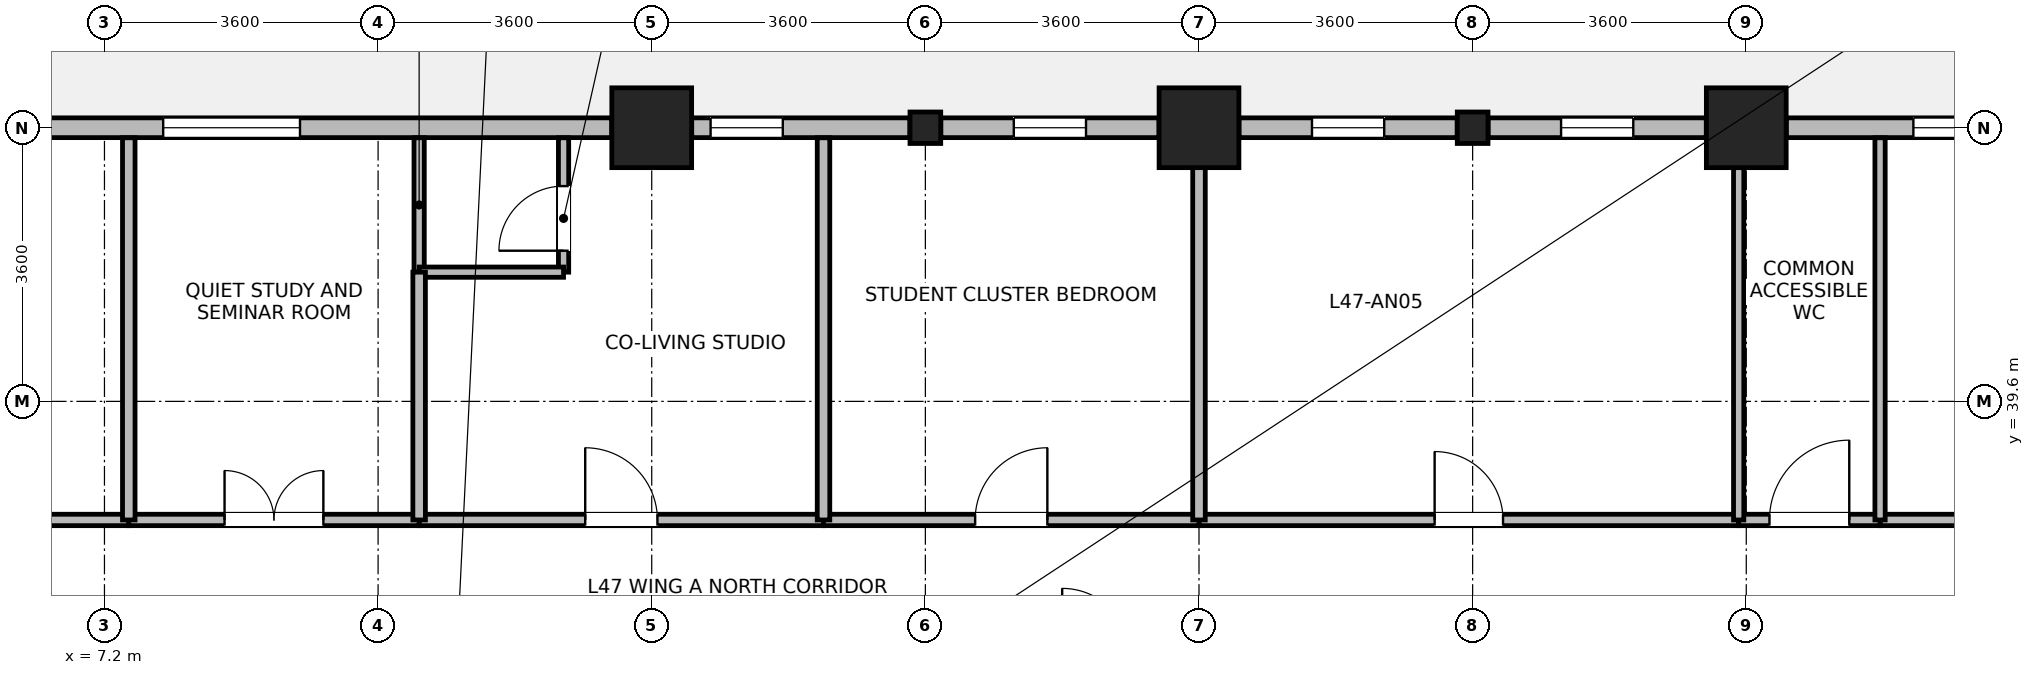
"""IFC4 building model, lengths in metres.
Left out: names, types, materials, properties, quantities, classifications, styles, units other than length and angle.
Written with IfcOpenShell. Run it as: python <this file> out.ifc"""

import sys

from ifc_helpers import new_model, si_unit, direction, frame, frame_2d, origin, origin_2d, place, context, subcontext, project, spatial, rectangle, i_section, extrude, source, transform, mapped, element, fill, save


model = new_model("IFC4")
c1 = context("Model", 3, precision=1e-05, world=origin(), true_north=direction((0.0, 1.0)))
c2 = subcontext(c1, "Body", "Model", "MODEL_VIEW")
j1 = project(units=[si_unit("LENGTHUNIT", "METRE"), si_unit("PLANEANGLEUNIT", "RADIAN")], contexts=[c1])
p1 = place(None, origin())
s1 = spatial("IfcSite", under=j1, at=p1, CompositionType="ELEMENT")
p2 = place(p1, origin())
s2 = spatial("IfcBuilding", under=s1, at=p2, CompositionType="ELEMENT")
p3 = place(p2, frame((0.0, 0.0, 184.6)))
s3 = spatial("IfcBuildingStorey", under=s2, at=p3, CompositionType="ELEMENT", Elevation=184.6)
m1 = source(origin(), c2, "Body", "SweptSolid", [
    extrude(rectangle(XDim=1.05, YDim=1.05, at=origin_2d()), origin(), (0.0, 0.0, 1.0), 3.7),
])
for number, where, z_axis, x_axis in (
    (1, (14.4, 43.2, 0.0), (0.0, 0.0, 1.0), (1.0, 0.0, 0.0)),
    (2, (21.6, 43.2, 0.0), (0.0, 0.0, 1.0), (1.0, 0.0, 0.0)),
    (3, (28.8, 43.2, 0.0), (0.0, 0.0, 1.0), (1.0, 0.0, 0.0)),
):
    element("IfcColumn", number, at=place(p3, frame(where, z_axis=z_axis, x_axis=x_axis)), inside=s3, PredefinedType="COLUMN", context=c2, shape_type="MappedRepresentation", body=[
        mapped(m1, transform((0.0, 0.0, 0.0), x_axis=(1.0, 0.0, 0.0), y_axis=(0.0, 1.0, 0.0), z_axis=(0.0, 0.0, 1.0), scale=1.0)),
    ])
m2 = source(origin(), c2, "Body", "SweptSolid", [
    extrude(i_section(OverallWidth=0.404, OverallDepth=0.414, WebThickness=0.021, FlangeThickness=0.028, FilletRadius=0.015, at=origin_2d()), origin(), (0.0, 0.0, 1.0), 3.7),
])
for number, where, z_axis, x_axis in (
    (4, (18.0, 43.2, 0.0), (0.0, 0.0, 1.0), (1.0, 0.0, 0.0)),
    (5, (25.2, 43.2, 0.0), (0.0, 0.0, 1.0), (1.0, 0.0, 0.0)),
):
    element("IfcColumn", number, at=place(p3, frame(where, z_axis=z_axis, x_axis=x_axis)), inside=s3, PredefinedType="COLUMN", context=c2, shape_type="MappedRepresentation", body=[
        mapped(m2, transform((0.0, 0.0, 0.0), x_axis=(1.0, 0.0, 0.0), y_axis=(0.0, 1.0, 0.0), z_axis=(0.0, 0.0, 1.0), scale=1.0)),
    ])
p4 = place(p3, frame((29.326, 43.2, 0.0), z_axis=(0.0, 0.0, 1.0), x_axis=(1.0, 0.0, 0.0)))
e6 = element("IfcWall", 6, at=p4, inside=s3, PredefinedType="STANDARD", context=c2, shape_type="SweptSolid", body=[
    extrude(rectangle(XDim=2.871, YDim=0.26, at=frame_2d((1.436, 0.0))), origin(), (0.0, 0.0, 1.0), 2.99),
])
p5 = place(p4, frame((1.673, 0.0, 0.85)))
e7 = element("IfcOpeningElement", 7, at=p5, cuts=e6, PredefinedType="OPENING", context=c2, shape_type="SweptSolid", body=[
    extrude(rectangle(XDim=0.95, YDim=1.75, at=frame_2d((0.475, 0.875))), frame((0.0, 0.14, 0.0), z_axis=(0.0, -1.0, 0.0), x_axis=(1.0, 0.0, 0.0)), (0.0, 0.0, 1.0), 0.28),
])
p6 = place(p3, frame((25.403, 43.2, 0.0), z_axis=(0.0, 0.0, 1.0), x_axis=(1.0, 0.0, 0.0)))
e8 = element("IfcWall", 8, at=p6, inside=s3, PredefinedType="STANDARD", context=c2, shape_type="SweptSolid", body=[
    extrude(rectangle(XDim=2.871, YDim=0.26, at=frame_2d((1.436, 0.0))), origin(), (0.0, 0.0, 1.0), 2.99),
])
p7 = place(p6, frame((0.96, 0.0, 0.85)))
e9 = element("IfcOpeningElement", 9, at=p7, cuts=e8, PredefinedType="OPENING", context=c2, shape_type="SweptSolid", body=[
    extrude(rectangle(XDim=0.95, YDim=1.75, at=frame_2d((0.475, 0.875))), frame((0.0, 0.14, 0.0), z_axis=(0.0, -1.0, 0.0), x_axis=(1.0, 0.0, 0.0)), (0.0, 0.0, 1.0), 0.28),
])
p8 = place(p3, frame((22.126, 43.2, 0.0), z_axis=(0.0, 0.0, 1.0), x_axis=(1.0, 0.0, 0.0)))
e10 = element("IfcWall", 10, at=p8, inside=s3, PredefinedType="STANDARD", context=c2, shape_type="SweptSolid", body=[
    extrude(rectangle(XDim=2.871, YDim=0.26, at=frame_2d((1.436, 0.0))), origin(), (0.0, 0.0, 1.0), 2.99),
])
p9 = place(p8, frame((0.96, 0.0, 0.85)))
e11 = element("IfcOpeningElement", 11, at=p9, cuts=e10, PredefinedType="OPENING", context=c2, shape_type="SweptSolid", body=[
    extrude(rectangle(XDim=0.95, YDim=1.75, at=frame_2d((0.475, 0.875))), frame((0.0, 0.14, 0.0), z_axis=(0.0, -1.0, 0.0), x_axis=(1.0, 0.0, 0.0)), (0.0, 0.0, 1.0), 0.28),
])
p10 = place(p3, frame((18.203, 43.2, 0.0), z_axis=(0.0, 0.0, 1.0), x_axis=(1.0, 0.0, 0.0)))
e12 = element("IfcWall", 12, at=p10, inside=s3, PredefinedType="STANDARD", context=c2, shape_type="SweptSolid", body=[
    extrude(rectangle(XDim=2.871, YDim=0.26, at=frame_2d((1.436, 0.0))), origin(), (0.0, 0.0, 1.0), 2.99),
])
p11 = place(p10, frame((0.96, 0.0, 0.85)))
e13 = element("IfcOpeningElement", 13, at=p11, cuts=e12, PredefinedType="OPENING", context=c2, shape_type="SweptSolid", body=[
    extrude(rectangle(XDim=0.95, YDim=1.75, at=frame_2d((0.475, 0.875))), frame((0.0, 0.14, 0.0), z_axis=(0.0, -1.0, 0.0), x_axis=(1.0, 0.0, 0.0)), (0.0, 0.0, 1.0), 0.28),
])
p12 = place(p3, frame((14.926, 43.2, 0.0), z_axis=(0.0, 0.0, 1.0), x_axis=(1.0, 0.0, 0.0)))
e14 = element("IfcWall", 14, at=p12, inside=s3, PredefinedType="STANDARD", context=c2, shape_type="SweptSolid", body=[
    extrude(rectangle(XDim=2.871, YDim=0.26, at=frame_2d((1.436, 0.0))), origin(), (0.0, 0.0, 1.0), 2.99),
])
p13 = place(p12, frame((0.249, 0.0, 0.85)))
e15 = element("IfcOpeningElement", 15, at=p13, cuts=e14, PredefinedType="OPENING", context=c2, shape_type="SweptSolid", body=[
    extrude(rectangle(XDim=0.95, YDim=1.75, at=frame_2d((0.475, 0.875))), frame((0.0, 0.14, 0.0), z_axis=(0.0, -1.0, 0.0), x_axis=(1.0, 0.0, 0.0)), (0.0, 0.0, 1.0), 0.28),
])
p14 = place(p3, frame((0.537, 43.2, 0.0), z_axis=(0.0, 0.0, 1.0), x_axis=(1.0, 0.0, 0.0)))
e16 = element("IfcWall", 16, at=p14, inside=s3, PredefinedType="STANDARD", context=c2, shape_type="SweptSolid", body=[
    extrude(rectangle(XDim=13.337, YDim=0.26, at=frame_2d((6.668, 0.0))), origin(), (0.0, 0.0, 1.0), 3.44),
])
p15 = place(p14, frame((0.767, 0.0, 0.85)))
e17 = element("IfcOpeningElement", 17, at=p15, cuts=e16, PredefinedType="OPENING", context=c2, shape_type="SweptSolid", body=[
    extrude(rectangle(XDim=1.8, YDim=1.85, at=frame_2d((0.9, 0.925))), frame((0.0, 0.14, 0.0), z_axis=(0.0, -1.0, 0.0), x_axis=(1.0, 0.0, 0.0)), (0.0, 0.0, 1.0), 0.28),
])
p16 = place(p14, frame((4.101, 0.0, 0.85)))
e18 = element("IfcOpeningElement", 18, at=p16, cuts=e16, PredefinedType="OPENING", context=c2, shape_type="SweptSolid", body=[
    extrude(rectangle(XDim=1.8, YDim=1.85, at=frame_2d((0.9, 0.925))), frame((0.0, 0.14, 0.0), z_axis=(0.0, -1.0, 0.0), x_axis=(1.0, 0.0, 0.0)), (0.0, 0.0, 1.0), 0.28),
])
p17 = place(p14, frame((7.436, 0.0, 0.85)))
e19 = element("IfcOpeningElement", 19, at=p17, cuts=e16, PredefinedType="OPENING", context=c2, shape_type="SweptSolid", body=[
    extrude(rectangle(XDim=1.8, YDim=1.85, at=frame_2d((0.9, 0.925))), frame((0.0, 0.14, 0.0), z_axis=(0.0, -1.0, 0.0), x_axis=(1.0, 0.0, 0.0)), (0.0, 0.0, 1.0), 0.28),
])
p18 = place(p3, frame((11.34, 41.3, 0.0), z_axis=(0.0, 0.0, 1.0), x_axis=(0.0, 1.0, 0.0)))
e20 = element("IfcWall", 20, at=p18, inside=s3, PredefinedType="PARTITIONING", context=c2, shape_type="SweptSolid", body=[
    extrude(rectangle(XDim=1.768, YDim=0.135, at=frame_2d((0.884, 0.0))), origin(), (0.0, 0.0, 1.0), 3.44),
])
p19 = place(p3, frame((13.24, 41.3, 0.0), z_axis=(0.0, 0.0, 1.0), x_axis=(0.0, 1.0, 0.0)))
e21 = element("IfcWall", 21, at=p19, inside=s3, PredefinedType="PARTITIONING", context=c2, shape_type="SweptSolid", body=[
    extrude(rectangle(XDim=1.768, YDim=0.135, at=frame_2d((0.884, 0.0))), origin(), (0.0, 0.0, 1.0), 3.44),
])
p20 = place(p19, frame((0.282, 0.0, 0.0)))
e22 = element("IfcOpeningElement", 22, at=p20, cuts=e21, PredefinedType="OPENING", context=c2, shape_type="SweptSolid", body=[
    extrude(rectangle(XDim=0.85, YDim=2.04, at=frame_2d((0.425, 1.02))), frame((0.0, 0.078, 0.0), z_axis=(0.0, -1.0, 0.0), x_axis=(1.0, 0.0, 0.0)), (0.0, 0.0, 1.0), 0.155),
])
p21 = place(p3, frame((11.34, 41.3, 0.0), z_axis=(0.0, 0.0, 1.0), x_axis=(1.0, 0.0, 0.0)))
e23 = element("IfcWall", 23, at=p21, inside=s3, PredefinedType="PARTITIONING", context=c2, shape_type="SweptSolid", body=[
    extrude(rectangle(XDim=1.9, YDim=0.135, at=frame_2d((0.95, 0.0))), origin(), (0.0, 0.0, 1.0), 3.44),
])
p22 = place(p3, frame((21.6, 38.04, 0.0), z_axis=(0.0, 0.0, 1.0), x_axis=(1.0, 0.0, 0.0)))
e24 = element("IfcWall", 24, at=p22, inside=s3, PredefinedType="PARTITIONING", context=c2, shape_type="SweptSolid", body=[
    extrude(rectangle(XDim=7.1, YDim=0.15, at=frame_2d((3.55, 0.0))), origin(), (0.0, 0.0, 1.0), 3.44),
])
p23 = place(p22, frame((3.1, 0.0, 0.0)))
e25 = element("IfcOpeningElement", 25, at=p23, cuts=e24, PredefinedType="OPENING", context=c2, shape_type="SweptSolid", body=[
    extrude(rectangle(XDim=0.9, YDim=2.08, at=frame_2d((0.45, 1.04))), frame((0.0, 0.085, 0.0), z_axis=(0.0, -1.0, 0.0), x_axis=(1.0, 0.0, 0.0)), (0.0, 0.0, 1.0), 0.17),
])
p24 = place(p3, frame((0.52, 38.04, 0.0), z_axis=(0.0, 0.0, 1.0), x_axis=(1.0, 0.0, 0.0)))
e26 = element("IfcWall", 26, at=p24, inside=s3, PredefinedType="PARTITIONING", context=c2, shape_type="SweptSolid", body=[
    extrude(rectangle(XDim=7.0, YDim=0.15, at=frame_2d((3.5, 0.0))), origin(), (0.0, 0.0, 1.0), 3.44),
])
p25 = place(p24, frame((2.85, 0.0, 0.0)))
e27 = element("IfcOpeningElement", 27, at=p25, cuts=e26, PredefinedType="OPENING", context=c2, shape_type="SweptSolid", body=[
    extrude(rectangle(XDim=1.3, YDim=2.12, at=frame_2d((0.65, 1.06))), frame((0.0, 0.085, 0.0), z_axis=(0.0, -1.0, 0.0), x_axis=(1.0, 0.0, 0.0)), (0.0, 0.0, 1.0), 0.17),
])
p26 = place(p3, frame((11.34, 38.04, 0.0), z_axis=(0.0, 0.0, 1.0), x_axis=(1.0, 0.0, 0.0)))
e28 = element("IfcWall", 28, at=p26, inside=s3, PredefinedType="PARTITIONING", context=c2, shape_type="SweptSolid", body=[
    extrude(rectangle(XDim=5.32, YDim=0.15, at=frame_2d((2.66, 0.0))), origin(), (0.0, 0.0, 1.0), 3.44),
])
p27 = place(p26, frame((2.185, 0.0, 0.0)))
e29 = element("IfcOpeningElement", 29, at=p27, cuts=e28, PredefinedType="OPENING", context=c2, shape_type="SweptSolid", body=[
    extrude(rectangle(XDim=0.95, YDim=2.1, at=frame_2d((0.475, 1.05))), frame((0.0, 0.085, 0.0), z_axis=(0.0, -1.0, 0.0), x_axis=(1.0, 0.0, 0.0)), (0.0, 0.0, 1.0), 0.17),
])
p28 = place(p3, frame((16.66, 38.04, 0.0), z_axis=(0.0, 0.0, 1.0), x_axis=(1.0, 0.0, 0.0)))
e30 = element("IfcWall", 30, at=p28, inside=s3, PredefinedType="PARTITIONING", context=c2, shape_type="SweptSolid", body=[
    extrude(rectangle(XDim=4.94, YDim=0.15, at=frame_2d((2.47, 0.0))), origin(), (0.0, 0.0, 1.0), 3.44),
])
p29 = place(p28, frame((1.995, 0.0, 0.0)))
e31 = element("IfcOpeningElement", 31, at=p29, cuts=e30, PredefinedType="OPENING", context=c2, shape_type="SweptSolid", body=[
    extrude(rectangle(XDim=0.95, YDim=2.1, at=frame_2d((0.475, 1.05))), frame((0.0, 0.085, 0.0), z_axis=(0.0, -1.0, 0.0), x_axis=(1.0, 0.0, 0.0)), (0.0, 0.0, 1.0), 0.17),
])
p30 = place(p3, frame((30.56, 38.04, 0.0), z_axis=(0.0, 0.0, 1.0), x_axis=(1.0, 0.0, 0.0)))
e32 = element("IfcWall", 32, at=p30, inside=s3, PredefinedType="PARTITIONING", context=c2, shape_type="SweptSolid", body=[
    extrude(rectangle(XDim=4.8, YDim=0.15, at=frame_2d((2.4, 0.0))), origin(), (0.0, 0.0, 1.0), 3.44),
])
p31 = place(p30, frame((1.75, 0.0, 0.0)))
e33 = element("IfcOpeningElement", 33, at=p31, cuts=e32, PredefinedType="OPENING", context=c2, shape_type="SweptSolid", body=[
    extrude(rectangle(XDim=1.3, YDim=2.12, at=frame_2d((0.65, 1.06))), frame((0.0, 0.085, 0.0), z_axis=(0.0, -1.0, 0.0), x_axis=(1.0, 0.0, 0.0)), (0.0, 0.0, 1.0), 0.17),
])
p32 = place(p3, frame((7.52, 38.04, 0.0), z_axis=(0.0, 0.0, 1.0), x_axis=(1.0, 0.0, 0.0)))
e34 = element("IfcWall", 34, at=p32, inside=s3, PredefinedType="PARTITIONING", context=c2, shape_type="SweptSolid", body=[
    extrude(rectangle(XDim=3.82, YDim=0.15, at=frame_2d((1.91, 0.0))), origin(), (0.0, 0.0, 1.0), 3.44),
])
p33 = place(p32, frame((1.26, 0.0, 0.0)))
e35 = element("IfcOpeningElement", 35, at=p33, cuts=e34, PredefinedType="OPENING", context=c2, shape_type="SweptSolid", body=[
    extrude(rectangle(XDim=1.3, YDim=2.12, at=frame_2d((0.65, 1.06))), frame((0.0, 0.085, 0.0), z_axis=(0.0, -1.0, 0.0), x_axis=(1.0, 0.0, 0.0)), (0.0, 0.0, 1.0), 0.17),
])
p34 = place(p3, frame((28.7, 38.04, 0.0), z_axis=(0.0, 0.0, 1.0), x_axis=(1.0, 0.0, 0.0)))
e36 = element("IfcWall", 36, at=p34, inside=s3, PredefinedType="PARTITIONING", context=c2, shape_type="SweptSolid", body=[
    extrude(rectangle(XDim=1.86, YDim=0.15, at=frame_2d((0.93, 0.0))), origin(), (0.0, 0.0, 1.0), 3.44),
])
p35 = place(p34, frame((0.405, 0.0, 0.0)))
e37 = element("IfcOpeningElement", 37, at=p35, cuts=e36, PredefinedType="OPENING", context=c2, shape_type="SweptSolid", body=[
    extrude(rectangle(XDim=1.05, YDim=2.12, at=frame_2d((0.525, 1.06))), frame((0.0, 0.085, 0.0), z_axis=(0.0, -1.0, 0.0), x_axis=(1.0, 0.0, 0.0)), (0.0, 0.0, 1.0), 0.17),
])
for number, where, z_axis, x_axis in (
    (38, (7.52, 38.04, 0.0), (0.0, 0.0, 1.0), (0.0, 1.0, 0.0)),
    (39, (16.66, 38.04, 0.0), (0.0, 0.0, 1.0), (0.0, 1.0, 0.0)),
):
    element("IfcWall", number, at=place(p3, frame(where, z_axis=z_axis, x_axis=x_axis)), inside=s3, PredefinedType="PARTITIONING", context=c2, shape_type="SweptSolid", body=[
        extrude(rectangle(XDim=5.028, YDim=0.165, at=frame_2d((2.514, 0.0))), origin(), (0.0, 0.0, 1.0), 3.44),
    ])
p36 = place(p3, frame((21.6, 38.04, 0.0), z_axis=(0.0, 0.0, 1.0), x_axis=(0.0, 1.0, 0.0)))
e40 = element("IfcWall", 40, at=p36, inside=s3, PredefinedType="PARTITIONING", context=c2, shape_type="SweptSolid", body=[
    extrude(rectangle(XDim=5.028, YDim=0.165, at=frame_2d((2.514, 0.0))), origin(), (0.0, 0.0, 1.0), 2.99),
])
p37 = place(p3, frame((28.7, 38.04, 0.0), z_axis=(0.0, 0.0, 1.0), x_axis=(0.0, 1.0, 0.0)))
e41 = element("IfcWall", 41, at=p37, inside=s3, PredefinedType="PARTITIONING", context=c2, shape_type="SweptSolid", body=[
    extrude(rectangle(XDim=5.028, YDim=0.135, at=frame_2d((2.514, 0.0))), origin(), (0.0, 0.0, 1.0), 2.99),
])
p38 = place(p3, frame((30.56, 38.04, 0.0), z_axis=(0.0, 0.0, 1.0), x_axis=(0.0, 1.0, 0.0)))
e42 = element("IfcWall", 42, at=p38, inside=s3, PredefinedType="PARTITIONING", context=c2, shape_type="SweptSolid", body=[
    extrude(rectangle(XDim=5.028, YDim=0.135, at=frame_2d((2.514, 0.0))), origin(), (0.0, 0.0, 1.0), 3.44),
])
p39 = place(p3, frame((11.34, 38.04, 0.0), z_axis=(0.0, 0.0, 1.0), x_axis=(0.0, 1.0, 0.0)))
e43 = element("IfcWall", 43, at=p39, inside=s3, PredefinedType="PARTITIONING", context=c2, shape_type="SweptSolid", body=[
    extrude(rectangle(XDim=3.26, YDim=0.165, at=frame_2d((1.63, 0.0))), origin(), (0.0, 0.0, 1.0), 3.44),
])
p40 = place(p5, origin())
e44 = element("IfcWindow", 44, at=p40, inside=s3, PartitioningType="SINGLE_PANEL", PredefinedType="WINDOW", context=c2, shape_type="SweptSolid", body=[
    extrude(rectangle(XDim=0.95, YDim=1.75, at=frame_2d((0.475, 0.875))), frame((0.0, 0.03, 0.0), z_axis=(0.0, -1.0, 0.0), x_axis=(1.0, 0.0, 0.0)), (0.0, 0.0, 1.0), 0.06),
])
fill(e7, e44)
p41 = place(p7, origin())
e45 = element("IfcWindow", 45, at=p41, inside=s3, PartitioningType="SINGLE_PANEL", PredefinedType="WINDOW", context=c2, shape_type="SweptSolid", body=[
    extrude(rectangle(XDim=0.95, YDim=1.75, at=frame_2d((0.475, 0.875))), frame((0.0, 0.03, 0.0), z_axis=(0.0, -1.0, 0.0), x_axis=(1.0, 0.0, 0.0)), (0.0, 0.0, 1.0), 0.06),
])
fill(e9, e45)
p42 = place(p9, origin())
e46 = element("IfcWindow", 46, at=p42, inside=s3, PartitioningType="SINGLE_PANEL", PredefinedType="WINDOW", context=c2, shape_type="SweptSolid", body=[
    extrude(rectangle(XDim=0.95, YDim=1.75, at=frame_2d((0.475, 0.875))), frame((0.0, 0.03, 0.0), z_axis=(0.0, -1.0, 0.0), x_axis=(1.0, 0.0, 0.0)), (0.0, 0.0, 1.0), 0.06),
])
fill(e11, e46)
p43 = place(p11, origin())
e47 = element("IfcWindow", 47, at=p43, inside=s3, PartitioningType="SINGLE_PANEL", PredefinedType="WINDOW", context=c2, shape_type="SweptSolid", body=[
    extrude(rectangle(XDim=0.95, YDim=1.75, at=frame_2d((0.475, 0.875))), frame((0.0, 0.03, 0.0), z_axis=(0.0, -1.0, 0.0), x_axis=(1.0, 0.0, 0.0)), (0.0, 0.0, 1.0), 0.06),
])
fill(e13, e47)
p44 = place(p13, origin())
e48 = element("IfcWindow", 48, at=p44, inside=s3, PartitioningType="SINGLE_PANEL", PredefinedType="WINDOW", context=c2, shape_type="SweptSolid", body=[
    extrude(rectangle(XDim=0.95, YDim=1.75, at=frame_2d((0.475, 0.875))), frame((0.0, 0.03, 0.0), z_axis=(0.0, -1.0, 0.0), x_axis=(1.0, 0.0, 0.0)), (0.0, 0.0, 1.0), 0.06),
])
fill(e15, e48)
p45 = place(p17, origin())
e49 = element("IfcWindow", 49, at=p45, inside=s3, PartitioningType="SINGLE_PANEL", PredefinedType="WINDOW", context=c2, shape_type="SweptSolid", body=[
    extrude(rectangle(XDim=1.8, YDim=1.85, at=frame_2d((0.9, 0.925))), frame((0.0, 0.03, 0.0), z_axis=(0.0, -1.0, 0.0), x_axis=(1.0, 0.0, 0.0)), (0.0, 0.0, 1.0), 0.06),
])
fill(e19, e49)
p46 = place(p20, origin())
e50 = element("IfcDoor", 50, at=p46, inside=s3, OperationType="SINGLE_SWING_LEFT", PredefinedType="DOOR", context=c2, shape_type="SweptSolid", body=[
    extrude(rectangle(XDim=0.85, YDim=2.04, at=frame_2d((0.425, 1.02))), frame((0.0, 0.025, 0.0), z_axis=(0.0, -1.0, 0.0), x_axis=(1.0, 0.0, 0.0)), (0.0, 0.0, 1.0), 0.05),
])
fill(e22, e50)
p47 = place(p23, origin())
e51 = element("IfcDoor", 51, at=p47, inside=s3, OperationType="SINGLE_SWING_LEFT", PredefinedType="DOOR", context=c2, shape_type="SweptSolid", body=[
    extrude(rectangle(XDim=0.9, YDim=2.08, at=frame_2d((0.45, 1.04))), frame((0.0, 0.025, 0.0), z_axis=(0.0, -1.0, 0.0), x_axis=(1.0, 0.0, 0.0)), (0.0, 0.0, 1.0), 0.05),
])
fill(e25, e51)
p48 = place(p27, origin())
e52 = element("IfcDoor", 52, at=p48, inside=s3, OperationType="SINGLE_SWING_LEFT", PredefinedType="DOOR", context=c2, shape_type="SweptSolid", body=[
    extrude(rectangle(XDim=0.95, YDim=2.1, at=frame_2d((0.475, 1.05))), frame((0.0, 0.025, 0.0), z_axis=(0.0, -1.0, 0.0), x_axis=(1.0, 0.0, 0.0)), (0.0, 0.0, 1.0), 0.05),
])
fill(e29, e52)
p49 = place(p29, origin())
e53 = element("IfcDoor", 53, at=p49, inside=s3, OperationType="SINGLE_SWING_RIGHT", PredefinedType="DOOR", context=c2, shape_type="SweptSolid", body=[
    extrude(rectangle(XDim=0.95, YDim=2.1, at=frame_2d((0.475, 1.05))), frame((0.0, 0.025, 0.0), z_axis=(0.0, -1.0, 0.0), x_axis=(1.0, 0.0, 0.0)), (0.0, 0.0, 1.0), 0.05),
])
fill(e31, e53)
p50 = place(p33, origin())
e54 = element("IfcDoor", 54, at=p50, inside=s3, OperationType="DOUBLE_DOOR_SINGLE_SWING", PredefinedType="DOOR", context=c2, shape_type="SweptSolid", body=[
    extrude(rectangle(XDim=1.3, YDim=2.12, at=frame_2d((0.65, 1.06))), frame((0.0, 0.025, 0.0), z_axis=(0.0, -1.0, 0.0), x_axis=(1.0, 0.0, 0.0)), (0.0, 0.0, 1.0), 0.05),
])
fill(e35, e54)
p51 = place(p35, origin())
e55 = element("IfcDoor", 55, at=p51, inside=s3, OperationType="SINGLE_SWING_RIGHT", PredefinedType="DOOR", context=c2, shape_type="SweptSolid", body=[
    extrude(rectangle(XDim=1.05, YDim=2.12, at=frame_2d((0.525, 1.06))), frame((0.0, 0.025, 0.0), z_axis=(0.0, -1.0, 0.0), x_axis=(1.0, 0.0, 0.0)), (0.0, 0.0, 1.0), 0.05),
])
fill(e37, e55)
save(model, sys.argv[1])
